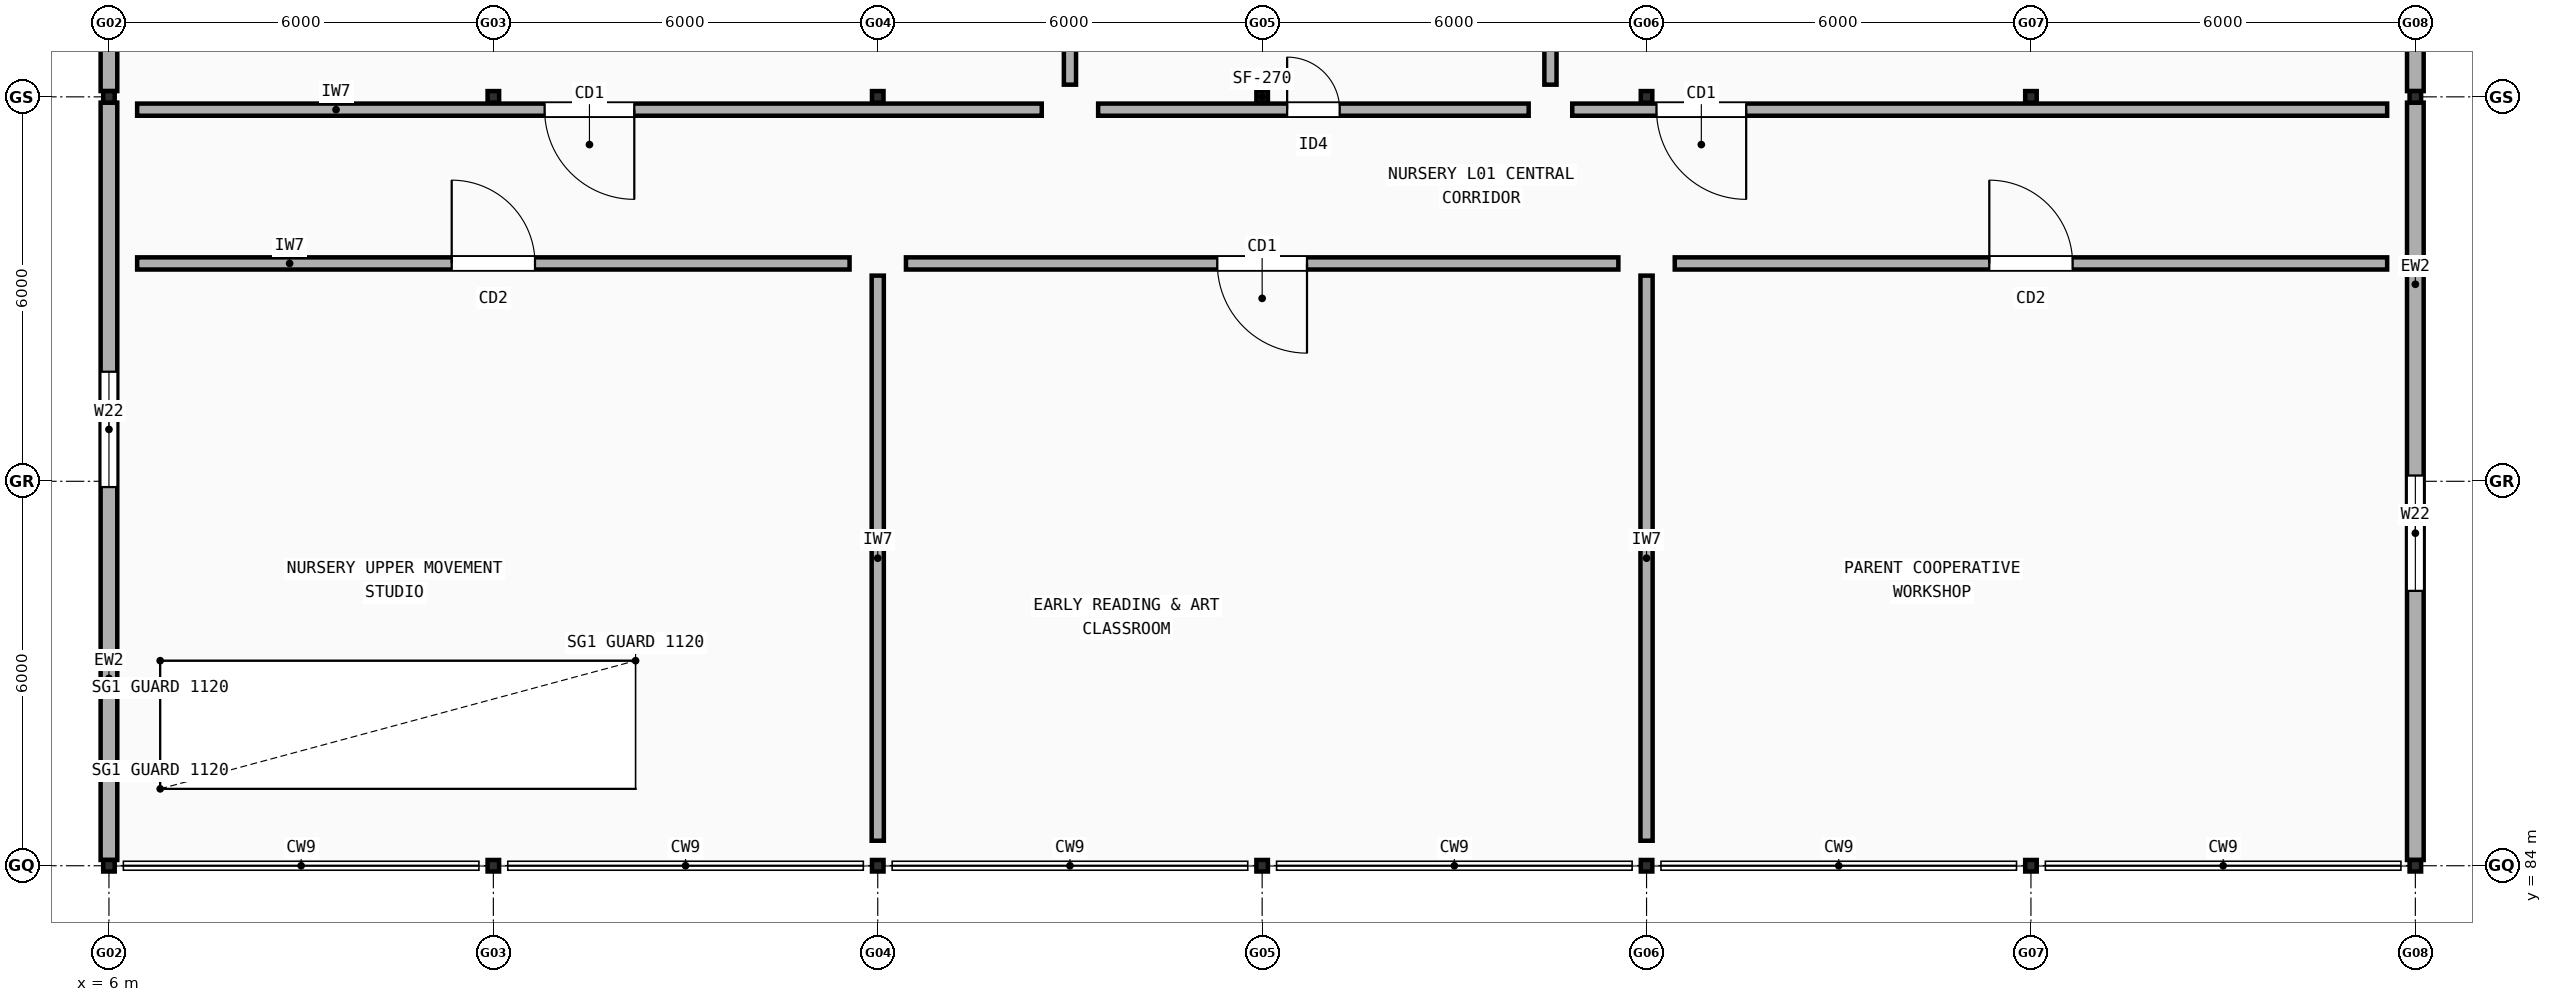
"""IFC4 building model, lengths in metres.
Left out: names, types, materials, properties, quantities, classifications, styles, units other than length and angle.
Written with IfcOpenShell. Run it as: python <this file> out.ifc"""

import sys

from ifc_helpers import new_model, si_unit, direction, frame, frame_2d, origin, origin_2d, place, context, subcontext, project, spatial, rectangle, hollow_rectangle, extrude, element, fill, save


model = new_model("IFC4")
c1 = context("Model", 3, precision=1e-05, world=origin(), true_north=direction((0.0, 1.0)))
c2 = subcontext(c1, "Body", "Model", "MODEL_VIEW")
j1 = project(units=[si_unit("LENGTHUNIT", "METRE"), si_unit("PLANEANGLEUNIT", "RADIAN")], contexts=[c1])
p1 = place(None, origin())
s1 = spatial("IfcSite", under=j1, at=p1, CompositionType="ELEMENT")
p2 = place(p1, origin())
s2 = spatial("IfcBuilding", under=s1, at=p2, CompositionType="ELEMENT")
p3 = place(p2, frame((0.0, 0.0, 4.5)))
s3 = spatial("IfcBuildingStorey", under=s2, at=p3, CompositionType="ELEMENT", Elevation=4.5)
p4 = place(p3, frame((6.0, 84.0, 0.0), z_axis=(0.0, 0.0, 1.0), x_axis=(1.0, 0.0, 0.0)))
e1 = element("IfcColumn", 1, at=p4, inside=s3, PredefinedType="COLUMN", context=c2, shape_type="SweptSolid", body=[
    extrude(hollow_rectangle(XDim=0.18, YDim=0.18, WallThickness=0.01, InnerFilletRadius=0.01, OuterFilletRadius=0.02, at=origin_2d()), origin(), (0.0, 0.0, 1.0), 3.16),
])
p5 = place(p3, frame((6.0, 96.0, 0.0), z_axis=(0.0, 0.0, 1.0), x_axis=(1.0, 0.0, 0.0)))
e2 = element("IfcColumn", 2, at=p5, inside=s3, PredefinedType="COLUMN", context=c2, shape_type="SweptSolid", body=[
    extrude(hollow_rectangle(XDim=0.18, YDim=0.18, WallThickness=0.01, InnerFilletRadius=0.01, OuterFilletRadius=0.02, at=origin_2d()), origin(), (0.0, 0.0, 1.0), 5.276),
])
p6 = place(p3, frame((12.0, 84.0, 0.0), z_axis=(0.0, 0.0, 1.0), x_axis=(1.0, 0.0, 0.0)))
e3 = element("IfcColumn", 3, at=p6, inside=s3, PredefinedType="COLUMN", context=c2, shape_type="SweptSolid", body=[
    extrude(hollow_rectangle(XDim=0.18, YDim=0.18, WallThickness=0.01, InnerFilletRadius=0.01, OuterFilletRadius=0.02, at=origin_2d()), origin(), (0.0, 0.0, 1.0), 3.16),
])
p7 = place(p3, frame((12.0, 96.0, 0.0), z_axis=(0.0, 0.0, 1.0), x_axis=(1.0, 0.0, 0.0)))
e4 = element("IfcColumn", 4, at=p7, inside=s3, PredefinedType="COLUMN", context=c2, shape_type="SweptSolid", body=[
    extrude(hollow_rectangle(XDim=0.18, YDim=0.18, WallThickness=0.01, InnerFilletRadius=0.01, OuterFilletRadius=0.02, at=origin_2d()), origin(), (0.0, 0.0, 1.0), 5.276),
])
p8 = place(p3, frame((18.0, 84.0, 0.0), z_axis=(0.0, 0.0, 1.0), x_axis=(1.0, 0.0, 0.0)))
e5 = element("IfcColumn", 5, at=p8, inside=s3, PredefinedType="COLUMN", context=c2, shape_type="SweptSolid", body=[
    extrude(hollow_rectangle(XDim=0.18, YDim=0.18, WallThickness=0.01, InnerFilletRadius=0.01, OuterFilletRadius=0.02, at=origin_2d()), origin(), (0.0, 0.0, 1.0), 3.16),
])
p9 = place(p3, frame((18.0, 96.0, 0.0), z_axis=(0.0, 0.0, 1.0), x_axis=(1.0, 0.0, 0.0)))
e6 = element("IfcColumn", 6, at=p9, inside=s3, PredefinedType="COLUMN", context=c2, shape_type="SweptSolid", body=[
    extrude(hollow_rectangle(XDim=0.18, YDim=0.18, WallThickness=0.01, InnerFilletRadius=0.01, OuterFilletRadius=0.02, at=origin_2d()), origin(), (0.0, 0.0, 1.0), 5.276),
])
p10 = place(p3, frame((24.0, 84.0, 0.0), z_axis=(0.0, 0.0, 1.0), x_axis=(1.0, 0.0, 0.0)))
e7 = element("IfcColumn", 7, at=p10, inside=s3, PredefinedType="COLUMN", context=c2, shape_type="SweptSolid", body=[
    extrude(hollow_rectangle(XDim=0.18, YDim=0.18, WallThickness=0.01, InnerFilletRadius=0.01, OuterFilletRadius=0.02, at=origin_2d()), origin(), (0.0, 0.0, 1.0), 3.16),
])
p11 = place(p3, frame((24.0, 96.0, 0.0), z_axis=(0.0, 0.0, 1.0), x_axis=(1.0, 0.0, 0.0)))
e8 = element("IfcColumn", 8, at=p11, inside=s3, PredefinedType="COLUMN", context=c2, shape_type="SweptSolid", body=[
    extrude(hollow_rectangle(XDim=0.18, YDim=0.18, WallThickness=0.01, InnerFilletRadius=0.01, OuterFilletRadius=0.02, at=origin_2d()), origin(), (0.0, 0.0, 1.0), 5.276),
])
p12 = place(p3, frame((30.0, 84.0, 0.0), z_axis=(0.0, 0.0, 1.0), x_axis=(1.0, 0.0, 0.0)))
e9 = element("IfcColumn", 9, at=p12, inside=s3, PredefinedType="COLUMN", context=c2, shape_type="SweptSolid", body=[
    extrude(hollow_rectangle(XDim=0.18, YDim=0.18, WallThickness=0.01, InnerFilletRadius=0.01, OuterFilletRadius=0.02, at=origin_2d()), origin(), (0.0, 0.0, 1.0), 3.16),
])
p13 = place(p3, frame((30.0, 96.0, 0.0), z_axis=(0.0, 0.0, 1.0), x_axis=(1.0, 0.0, 0.0)))
e10 = element("IfcColumn", 10, at=p13, inside=s3, PredefinedType="COLUMN", context=c2, shape_type="SweptSolid", body=[
    extrude(hollow_rectangle(XDim=0.18, YDim=0.18, WallThickness=0.01, InnerFilletRadius=0.01, OuterFilletRadius=0.02, at=origin_2d()), origin(), (0.0, 0.0, 1.0), 5.276),
])
p14 = place(p3, frame((36.0, 84.0, 0.0), z_axis=(0.0, 0.0, 1.0), x_axis=(1.0, 0.0, 0.0)))
e11 = element("IfcColumn", 11, at=p14, inside=s3, PredefinedType="COLUMN", context=c2, shape_type="SweptSolid", body=[
    extrude(hollow_rectangle(XDim=0.18, YDim=0.18, WallThickness=0.01, InnerFilletRadius=0.01, OuterFilletRadius=0.02, at=origin_2d()), origin(), (0.0, 0.0, 1.0), 3.16),
])
p15 = place(p3, frame((36.0, 96.0, 0.0), z_axis=(0.0, 0.0, 1.0), x_axis=(1.0, 0.0, 0.0)))
e12 = element("IfcColumn", 12, at=p15, inside=s3, PredefinedType="COLUMN", context=c2, shape_type="SweptSolid", body=[
    extrude(hollow_rectangle(XDim=0.18, YDim=0.18, WallThickness=0.01, InnerFilletRadius=0.01, OuterFilletRadius=0.02, at=origin_2d()), origin(), (0.0, 0.0, 1.0), 5.276),
])
p16 = place(p3, frame((42.0, 84.0, 0.0), z_axis=(0.0, 0.0, 1.0), x_axis=(1.0, 0.0, 0.0)))
e13 = element("IfcColumn", 13, at=p16, inside=s3, PredefinedType="COLUMN", context=c2, shape_type="SweptSolid", body=[
    extrude(hollow_rectangle(XDim=0.18, YDim=0.18, WallThickness=0.01, InnerFilletRadius=0.01, OuterFilletRadius=0.02, at=origin_2d()), origin(), (0.0, 0.0, 1.0), 3.16),
])
p17 = place(p3, frame((42.0, 96.0, 0.0), z_axis=(0.0, 0.0, 1.0), x_axis=(1.0, 0.0, 0.0)))
e14 = element("IfcColumn", 14, at=p17, inside=s3, PredefinedType="COLUMN", context=c2, shape_type="SweptSolid", body=[
    extrude(hollow_rectangle(XDim=0.18, YDim=0.18, WallThickness=0.01, InnerFilletRadius=0.01, OuterFilletRadius=0.02, at=origin_2d()), origin(), (0.0, 0.0, 1.0), 5.276),
])
p18 = place(p3, frame((6.0, 95.91, 0.0), z_axis=(0.0, 0.0, 1.0), x_axis=(0.0, -1.0, 0.0)))
e15 = element("IfcWall", 15, at=p18, inside=s3, PredefinedType="STANDARD", context=c2, shape_type="SweptSolid", body=[
    extrude(rectangle(XDim=11.82, YDim=0.26, at=frame_2d((5.91, 0.0))), origin(), (0.0, 0.0, 1.0), 2.7),
])
p19 = place(p18, frame((4.2, 0.0, 0.85)))
e16 = element("IfcOpeningElement", 16, at=p19, cuts=e15, PredefinedType="OPENING", context=c2, shape_type="SweptSolid", body=[
    extrude(rectangle(XDim=1.8, YDim=1.45, at=frame_2d((0.9, 0.725))), frame((0.0, 0.14, 0.0), z_axis=(0.0, -1.0, 0.0), x_axis=(1.0, 0.0, 0.0)), (0.0, 0.0, 1.0), 0.28),
])
p20 = place(p3, frame((42.0, 84.09, 0.0), z_axis=(0.0, 0.0, 1.0), x_axis=(0.0, 1.0, 0.0)))
e17 = element("IfcWall", 17, at=p20, inside=s3, PredefinedType="STANDARD", context=c2, shape_type="SweptSolid", body=[
    extrude(rectangle(XDim=11.82, YDim=0.26, at=frame_2d((5.91, 0.0))), origin(), (0.0, 0.0, 1.0), 2.7),
])
p21 = place(p20, frame((4.2, 0.0, 0.85)))
e18 = element("IfcOpeningElement", 18, at=p21, cuts=e17, PredefinedType="OPENING", context=c2, shape_type="SweptSolid", body=[
    extrude(rectangle(XDim=1.8, YDim=1.45, at=frame_2d((0.9, 0.725))), frame((0.0, 0.14, 0.0), z_axis=(0.0, -1.0, 0.0), x_axis=(1.0, 0.0, 0.0)), (0.0, 0.0, 1.0), 0.28),
])
p22 = place(p3, frame((6.0, 107.91, 0.0), z_axis=(0.0, 0.0, 1.0), x_axis=(0.0, -1.0, 0.0)))
e19 = element("IfcWall", 19, at=p22, inside=s3, PredefinedType="STANDARD", context=c2, shape_type="SweptSolid", body=[
    extrude(rectangle(XDim=11.82, YDim=0.26, at=frame_2d((5.91, 0.0))), origin(), (0.0, 0.0, 1.0), 2.7),
])
p23 = place(p22, frame((4.2, 0.0, 0.85)))
e20 = element("IfcOpeningElement", 20, at=p23, cuts=e19, PredefinedType="OPENING", context=c2, shape_type="SweptSolid", body=[
    extrude(rectangle(XDim=1.8, YDim=1.45, at=frame_2d((0.9, 0.725))), frame((0.0, 0.14, 0.0), z_axis=(0.0, -1.0, 0.0), x_axis=(1.0, 0.0, 0.0)), (0.0, 0.0, 1.0), 0.28),
])
p24 = place(p3, frame((42.0, 96.09, 0.0), z_axis=(0.0, 0.0, 1.0), x_axis=(0.0, 1.0, 0.0)))
e21 = element("IfcWall", 21, at=p24, inside=s3, PredefinedType="STANDARD", context=c2, shape_type="SweptSolid", body=[
    extrude(rectangle(XDim=11.82, YDim=0.26, at=frame_2d((5.91, 0.0))), origin(), (0.0, 0.0, 1.0), 2.7),
])
p25 = place(p24, frame((4.2, 0.0, 0.85)))
e22 = element("IfcOpeningElement", 22, at=p25, cuts=e21, PredefinedType="OPENING", context=c2, shape_type="SweptSolid", body=[
    extrude(rectangle(XDim=1.8, YDim=1.45, at=frame_2d((0.9, 0.725))), frame((0.0, 0.14, 0.0), z_axis=(0.0, -1.0, 0.0), x_axis=(1.0, 0.0, 0.0)), (0.0, 0.0, 1.0), 0.28),
])
p26 = place(p3, frame((6.44, 93.4, 0.0), z_axis=(0.0, 0.0, 1.0), x_axis=(1.0, 0.0, 0.0)))
e23 = element("IfcWall", 23, at=p26, inside=s3, PredefinedType="SOLIDWALL", context=c2, shape_type="SweptSolid", body=[
    extrude(rectangle(XDim=11.12, YDim=0.19, at=frame_2d((5.56, 0.0))), origin(), (0.0, 0.0, 1.0), 2.872),
])
p27 = place(p26, frame((4.91, 0.0, 0.0)))
e24 = element("IfcOpeningElement", 24, at=p27, cuts=e23, PredefinedType="OPENING", context=c2, shape_type="SweptSolid", body=[
    extrude(rectangle(XDim=1.3, YDim=2.15, at=frame_2d((0.65, 1.075))), frame((0.0, 0.105, 0.0), z_axis=(0.0, -1.0, 0.0), x_axis=(1.0, 0.0, 0.0)), (0.0, 0.0, 1.0), 0.21),
])
p28 = place(p3, frame((18.0, 84.39, 0.0), z_axis=(0.0, 0.0, 1.0), x_axis=(0.0, 1.0, 0.0)))
e25 = element("IfcWall", 25, at=p28, inside=s3, PredefinedType="SOLIDWALL", context=c2, shape_type="SweptSolid", body=[
    extrude(rectangle(XDim=8.82, YDim=0.19, at=frame_2d((4.41, 0.0))), origin(), (0.0, 0.0, 1.0), 2.872),
])
p29 = place(p3, frame((18.44, 93.4, 0.0), z_axis=(0.0, 0.0, 1.0), x_axis=(1.0, 0.0, 0.0)))
e26 = element("IfcWall", 26, at=p29, inside=s3, PredefinedType="SOLIDWALL", context=c2, shape_type="SweptSolid", body=[
    extrude(rectangle(XDim=11.12, YDim=0.19, at=frame_2d((5.56, 0.0))), origin(), (0.0, 0.0, 1.0), 2.872),
])
p30 = place(p29, frame((4.86, 0.0, 0.0)))
e27 = element("IfcOpeningElement", 27, at=p30, cuts=e26, PredefinedType="OPENING", context=c2, shape_type="SweptSolid", body=[
    extrude(rectangle(XDim=1.4, YDim=2.15, at=frame_2d((0.7, 1.075))), frame((0.0, 0.105, 0.0), z_axis=(0.0, -1.0, 0.0), x_axis=(1.0, 0.0, 0.0)), (0.0, 0.0, 1.0), 0.21),
])
p31 = place(p3, frame((30.0, 84.39, 0.0), z_axis=(0.0, 0.0, 1.0), x_axis=(0.0, 1.0, 0.0)))
e28 = element("IfcWall", 28, at=p31, inside=s3, PredefinedType="SOLIDWALL", context=c2, shape_type="SweptSolid", body=[
    extrude(rectangle(XDim=8.82, YDim=0.19, at=frame_2d((4.41, 0.0))), origin(), (0.0, 0.0, 1.0), 2.872),
])
p32 = place(p3, frame((30.44, 93.4, 0.0), z_axis=(0.0, 0.0, 1.0), x_axis=(1.0, 0.0, 0.0)))
e29 = element("IfcWall", 29, at=p32, inside=s3, PredefinedType="SOLIDWALL", context=c2, shape_type="SweptSolid", body=[
    extrude(rectangle(XDim=11.12, YDim=0.19, at=frame_2d((5.56, 0.0))), origin(), (0.0, 0.0, 1.0), 2.872),
])
p33 = place(p32, frame((4.91, 0.0, 0.0)))
e30 = element("IfcOpeningElement", 30, at=p33, cuts=e29, PredefinedType="OPENING", context=c2, shape_type="SweptSolid", body=[
    extrude(rectangle(XDim=1.3, YDim=2.15, at=frame_2d((0.65, 1.075))), frame((0.0, 0.105, 0.0), z_axis=(0.0, -1.0, 0.0), x_axis=(1.0, 0.0, 0.0)), (0.0, 0.0, 1.0), 0.21),
])
p34 = place(p3, frame((6.44, 95.8, 0.0), z_axis=(0.0, 0.0, 1.0), x_axis=(1.0, 0.0, 0.0)))
e31 = element("IfcWall", 31, at=p34, inside=s3, PredefinedType="SOLIDWALL", context=c2, shape_type="SweptSolid", body=[
    extrude(rectangle(XDim=14.12, YDim=0.19, at=frame_2d((7.06, 0.0))), origin(), (0.0, 0.0, 1.0), 2.872),
])
p35 = place(p34, frame((6.36, 0.0, 0.0)))
e32 = element("IfcOpeningElement", 32, at=p35, cuts=e31, PredefinedType="OPENING", context=c2, shape_type="SweptSolid", body=[
    extrude(rectangle(XDim=1.4, YDim=2.15, at=frame_2d((0.7, 1.075))), frame((0.0, 0.105, 0.0), z_axis=(0.0, -1.0, 0.0), x_axis=(1.0, 0.0, 0.0)), (0.0, 0.0, 1.0), 0.21),
])
p36 = place(p3, frame((21.0, 96.19, 0.0), z_axis=(0.0, 0.0, 1.0), x_axis=(0.0, 1.0, 0.0)))
e33 = element("IfcWall", 33, at=p36, inside=s3, PredefinedType="SOLIDWALL", context=c2, shape_type="SweptSolid", body=[
    extrude(rectangle(XDim=11.62, YDim=0.19, at=frame_2d((5.81, 0.0))), origin(), (0.0, 0.0, 1.0), 2.945),
])
p37 = place(p3, frame((21.44, 95.8, 0.0), z_axis=(0.0, 0.0, 1.0), x_axis=(1.0, 0.0, 0.0)))
e34 = element("IfcWall", 34, at=p37, inside=s3, PredefinedType="SOLIDWALL", context=c2, shape_type="SweptSolid", body=[
    extrude(rectangle(XDim=6.72, YDim=0.19, at=frame_2d((3.36, 0.0))), origin(), (0.0, 0.0, 1.0), 2.872),
])
p38 = place(p37, frame((2.95, 0.0, 0.0)))
e35 = element("IfcOpeningElement", 35, at=p38, cuts=e34, PredefinedType="OPENING", context=c2, shape_type="SweptSolid", body=[
    extrude(rectangle(XDim=0.82, YDim=2.08, at=frame_2d((0.41, 1.04))), frame((0.0, 0.105, 0.0), z_axis=(0.0, -1.0, 0.0), x_axis=(1.0, 0.0, 0.0)), (0.0, 0.0, 1.0), 0.21),
])
p39 = place(p3, frame((28.5, 96.19, 0.0), z_axis=(0.0, 0.0, 1.0), x_axis=(0.0, 1.0, 0.0)))
e36 = element("IfcWall", 36, at=p39, inside=s3, PredefinedType="SOLIDWALL", context=c2, shape_type="SweptSolid", body=[
    extrude(rectangle(XDim=11.62, YDim=0.19, at=frame_2d((5.81, 0.0))), origin(), (0.0, 0.0, 1.0), 2.945),
])
p40 = place(p3, frame((28.84, 95.8, 0.0), z_axis=(0.0, 0.0, 1.0), x_axis=(1.0, 0.0, 0.0)))
e37 = element("IfcWall", 37, at=p40, inside=s3, PredefinedType="SOLIDWALL", context=c2, shape_type="SweptSolid", body=[
    extrude(rectangle(XDim=12.72, YDim=0.19, at=frame_2d((6.36, 0.0))), origin(), (0.0, 0.0, 1.0), 2.872),
])
p41 = place(p40, frame((1.315, 0.0, 0.0)))
e38 = element("IfcOpeningElement", 38, at=p41, cuts=e37, PredefinedType="OPENING", context=c2, shape_type="SweptSolid", body=[
    extrude(rectangle(XDim=1.4, YDim=2.15, at=frame_2d((0.7, 1.075))), frame((0.0, 0.105, 0.0), z_axis=(0.0, -1.0, 0.0), x_axis=(1.0, 0.0, 0.0)), (0.0, 0.0, 1.0), 0.21),
])
p42 = place(p19, origin())
e39 = element("IfcWindow", 39, at=p42, inside=s3, PartitioningType="SINGLE_PANEL", PredefinedType="WINDOW", context=c2, shape_type="SweptSolid", body=[
    extrude(rectangle(XDim=1.8, YDim=1.45, at=frame_2d((0.9, 0.725))), frame((0.0, 0.03, 0.0), z_axis=(0.0, -1.0, 0.0), x_axis=(1.0, 0.0, 0.0)), (0.0, 0.0, 1.0), 0.06),
])
fill(e16, e39)
p43 = place(p21, origin())
e40 = element("IfcWindow", 40, at=p43, inside=s3, PartitioningType="SINGLE_PANEL", PredefinedType="WINDOW", context=c2, shape_type="SweptSolid", body=[
    extrude(rectangle(XDim=1.8, YDim=1.45, at=frame_2d((0.9, 0.725))), frame((0.0, 0.03, 0.0), z_axis=(0.0, -1.0, 0.0), x_axis=(1.0, 0.0, 0.0)), (0.0, 0.0, 1.0), 0.06),
])
fill(e18, e40)
p44 = place(p27, origin())
e41 = element("IfcDoor", 41, at=p44, inside=s3, OperationType="SINGLE_SWING_LEFT", PredefinedType="DOOR", context=c2, shape_type="SweptSolid", body=[
    extrude(rectangle(XDim=1.3, YDim=2.15, at=frame_2d((0.65, 1.075))), frame((0.0, 0.025, 0.0), z_axis=(0.0, -1.0, 0.0), x_axis=(1.0, 0.0, 0.0)), (0.0, 0.0, 1.0), 0.05),
])
fill(e24, e41)
p45 = place(p30, origin())
e42 = element("IfcDoor", 42, at=p45, inside=s3, OperationType="SINGLE_SWING_RIGHT", PredefinedType="DOOR", context=c2, shape_type="SweptSolid", body=[
    extrude(rectangle(XDim=1.4, YDim=2.15, at=frame_2d((0.7, 1.075))), frame((0.0, 0.025, 0.0), z_axis=(0.0, -1.0, 0.0), x_axis=(1.0, 0.0, 0.0)), (0.0, 0.0, 1.0), 0.05),
])
fill(e27, e42)
p46 = place(p33, origin())
e43 = element("IfcDoor", 43, at=p46, inside=s3, OperationType="SINGLE_SWING_LEFT", PredefinedType="DOOR", context=c2, shape_type="SweptSolid", body=[
    extrude(rectangle(XDim=1.3, YDim=2.15, at=frame_2d((0.65, 1.075))), frame((0.0, 0.025, 0.0), z_axis=(0.0, -1.0, 0.0), x_axis=(1.0, 0.0, 0.0)), (0.0, 0.0, 1.0), 0.05),
])
fill(e30, e43)
p47 = place(p35, origin())
e44 = element("IfcDoor", 44, at=p47, inside=s3, OperationType="SINGLE_SWING_RIGHT", PredefinedType="DOOR", context=c2, shape_type="SweptSolid", body=[
    extrude(rectangle(XDim=1.4, YDim=2.15, at=frame_2d((0.7, 1.075))), frame((0.0, 0.025, 0.0), z_axis=(0.0, -1.0, 0.0), x_axis=(1.0, 0.0, 0.0)), (0.0, 0.0, 1.0), 0.05),
])
fill(e32, e44)
p48 = place(p38, origin())
e45 = element("IfcDoor", 45, at=p48, inside=s3, OperationType="SINGLE_SWING_LEFT", PredefinedType="DOOR", context=c2, shape_type="SweptSolid", body=[
    extrude(rectangle(XDim=0.82, YDim=2.08, at=frame_2d((0.41, 1.04))), frame((0.0, 0.025, 0.0), z_axis=(0.0, -1.0, 0.0), x_axis=(1.0, 0.0, 0.0)), (0.0, 0.0, 1.0), 0.05),
])
fill(e35, e45)
p49 = place(p41, origin())
e46 = element("IfcDoor", 46, at=p49, inside=s3, OperationType="SINGLE_SWING_RIGHT", PredefinedType="DOOR", context=c2, shape_type="SweptSolid", body=[
    extrude(rectangle(XDim=1.4, YDim=2.15, at=frame_2d((0.7, 1.075))), frame((0.0, 0.025, 0.0), z_axis=(0.0, -1.0, 0.0), x_axis=(1.0, 0.0, 0.0)), (0.0, 0.0, 1.0), 0.05),
])
fill(e38, e46)
save(model, sys.argv[1])
